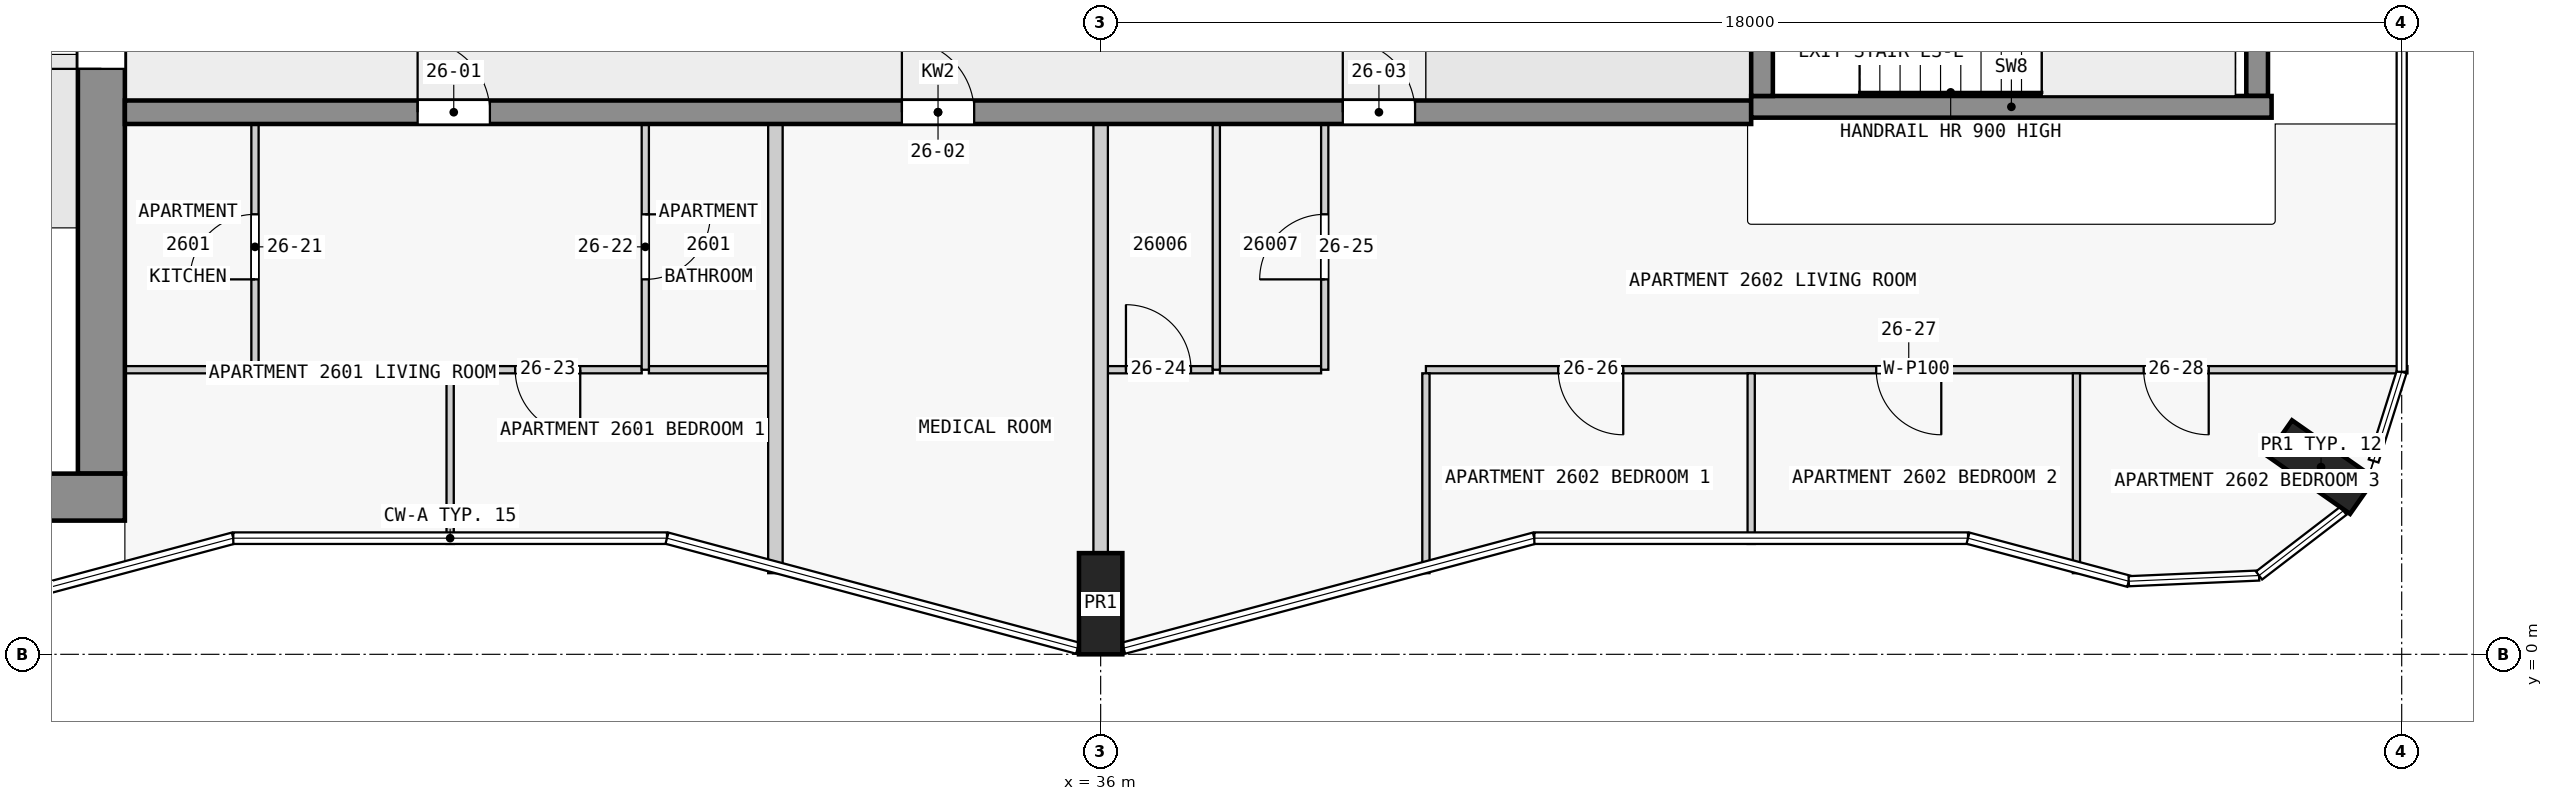
"""IFC4 building model, lengths in metres.
Left out: names, types, materials, properties, quantities, classifications, styles, units other than length and angle.
Written with IfcOpenShell. Run it as: python <this file> out.ifc"""

import sys

from ifc_helpers import new_model, si_unit, direction, frame, frame_2d, origin, origin_2d, place, context, subcontext, project, spatial, rectangle, extrude, element, fill, save


model = new_model("IFC4")
c1 = context("Model", 3, precision=1e-05, world=origin(), true_north=direction((0.0, 1.0)))
c2 = subcontext(c1, "Body", "Model", "MODEL_VIEW")
j1 = project(units=[si_unit("LENGTHUNIT", "METRE"), si_unit("PLANEANGLEUNIT", "RADIAN")], contexts=[c1])
p1 = place(None, origin())
s1 = spatial("IfcSite", under=j1, at=p1, CompositionType="ELEMENT")
p2 = place(p1, origin())
s2 = spatial("IfcBuilding", under=s1, at=p2, CompositionType="ELEMENT")
p3 = place(p2, frame((0.0, 0.0, 102.8)))
s3 = spatial("IfcBuildingStorey", under=s2, at=p3, CompositionType="ELEMENT", Elevation=102.8)
for number, where, z_axis, x_axis in (
    (1, (36.0, 0.7, 0.0), (0.0, 0.0, 1.0), (1.0, 0.0, 0.0)),
    (2, (52.884, 2.59, 0.0), (0.0, 0.0, 1.0), (0.574, 0.819, 0.0)),
):
    element("IfcColumn", number, at=place(p3, frame(where, z_axis=z_axis, x_axis=x_axis)), inside=s3, PredefinedType="COLUMN", context=c2, shape_type="SweptSolid", body=[
        extrude(rectangle(XDim=0.6, YDim=1.4, at=origin_2d()), origin(), (0.0, 0.0, 1.0), 3.5),
    ])
p4 = place(p3, frame((1.65, 2.175, 0.0), z_axis=(0.0, 0.0, 1.0), x_axis=(1.0, 0.0, 0.0)))
e3 = element("IfcWall", 3, at=p4, inside=s3, PredefinedType="SHEAR", context=c2, shape_type="SweptSolid", body=[
    extrude(rectangle(XDim=20.85, YDim=0.65, at=frame_2d((10.425, 0.0))), origin(), (0.0, 0.0, 1.0), 3.25),
])
p5 = place(p3, frame((22.175, 2.5, 0.0), z_axis=(0.0, 0.0, 1.0), x_axis=(0.0, 1.0, 0.0)))
e4 = element("IfcWall", 4, at=p5, inside=s3, PredefinedType="SHEAR", context=c2, shape_type="SweptSolid", body=[
    extrude(rectangle(XDim=14.85, YDim=0.65, at=frame_2d((7.425, 0.0))), origin(), (0.0, 0.0, 1.0), 3.25),
])
p6 = place(p5, frame((5.6, 0.0, 0.0)))
e5 = element("IfcOpeningElement", 5, at=p6, cuts=e4, PredefinedType="OPENING", context=c2, shape_type="SweptSolid", body=[
    extrude(rectangle(XDim=1.8, YDim=2.1, at=frame_2d((0.9, 1.05))), frame((0.0, 0.335, 0.0), z_axis=(0.0, -1.0, 0.0), x_axis=(1.0, 0.0, 0.0)), (0.0, 0.0, 1.0), 0.67),
])
p7 = place(p3, frame((45.15, 7.725, 0.0), z_axis=(0.0, 0.0, 1.0), x_axis=(0.0, 1.0, 0.0)))
e6 = element("IfcWall", 6, at=p7, inside=s3, PredefinedType="SHEAR", context=c2, shape_type="SweptSolid", body=[
    extrude(rectangle(XDim=2.55, YDim=0.3, at=frame_2d((1.275, 0.0))), origin(), (0.0, 0.0, 1.0), 3.5),
])
p8 = place(p7, frame((0.725, 0.0, 0.0)))
e7 = element("IfcOpeningElement", 7, at=p8, cuts=e6, PredefinedType="OPENING", context=c2, shape_type="SweptSolid", body=[
    extrude(rectangle(XDim=1.1, YDim=2.1, at=frame_2d((0.55, 1.05))), frame((0.0, 0.16, 0.0), z_axis=(0.0, -1.0, 0.0), x_axis=(1.0, 0.0, 0.0)), (0.0, 0.0, 1.0), 0.32),
])
p9 = place(p3, frame((52.0, 7.725, 0.0), z_axis=(0.0, 0.0, 1.0), x_axis=(0.0, 1.0, 0.0)))
e8 = element("IfcWall", 8, at=p9, inside=s3, PredefinedType="SHEAR", context=c2, shape_type="SweptSolid", body=[
    extrude(rectangle(XDim=2.55, YDim=0.3, at=frame_2d((1.275, 0.0))), origin(), (0.0, 0.0, 1.0), 3.5),
])
p10 = place(p3, frame((45.0, 7.575, 0.0), z_axis=(0.0, 0.0, 1.0), x_axis=(1.0, 0.0, 0.0)))
e9 = element("IfcWall", 9, at=p10, inside=s3, PredefinedType="SHEAR", context=c2, shape_type="SweptSolid", body=[
    extrude(rectangle(XDim=7.2, YDim=0.3, at=frame_2d((3.6, 0.0))), origin(), (0.0, 0.0, 1.0), 3.5),
])
p11 = place(p3, frame((22.5, 7.5, 0.0), z_axis=(0.0, 0.0, 1.0), x_axis=(1.0, 0.0, 0.0)))
e10 = element("IfcWall", 10, at=p11, inside=s3, PredefinedType="SHEAR", context=c2, shape_type="SweptSolid", body=[
    extrude(rectangle(XDim=22.5, YDim=0.325, at=frame_2d((11.25, 0.0))), origin(), (0.0, 0.0, 1.0), 3.25),
])
p12 = place(p11, frame((4.05, 0.0, 0.0)))
e11 = element("IfcOpeningElement", 11, at=p12, cuts=e10, PredefinedType="OPENING", context=c2, shape_type="SweptSolid", body=[
    extrude(rectangle(XDim=1.0, YDim=2.1, at=frame_2d((0.5, 1.05))), frame((0.0, 0.172, 0.0), z_axis=(0.0, -1.0, 0.0), x_axis=(1.0, 0.0, 0.0)), (0.0, 0.0, 1.0), 0.345),
])
p13 = place(p11, frame((10.75, 0.0, 0.0)))
e12 = element("IfcOpeningElement", 12, at=p13, cuts=e10, PredefinedType="OPENING", context=c2, shape_type="SweptSolid", body=[
    extrude(rectangle(XDim=1.0, YDim=2.1, at=frame_2d((0.5, 1.05))), frame((0.0, 0.172, 0.0), z_axis=(0.0, -1.0, 0.0), x_axis=(1.0, 0.0, 0.0)), (0.0, 0.0, 1.0), 0.345),
])
p14 = place(p11, frame((16.85, 0.0, 0.0)))
e13 = element("IfcOpeningElement", 13, at=p14, cuts=e10, PredefinedType="OPENING", context=c2, shape_type="SweptSolid", body=[
    extrude(rectangle(XDim=1.0, YDim=2.1, at=frame_2d((0.5, 1.05))), frame((0.0, 0.172, 0.0), z_axis=(0.0, -1.0, 0.0), x_axis=(1.0, 0.0, 0.0)), (0.0, 0.0, 1.0), 0.345),
])
p15 = place(p3, frame((29.65, 3.938, 0.0), z_axis=(0.0, 0.0, 1.0), x_axis=(-1.0, 0.0, 0.0)))
e14 = element("IfcWall", 14, at=p15, inside=s3, PredefinedType="PARTITIONING", context=c2, shape_type="SweptSolid", body=[
    extrude(rectangle(XDim=2.65, YDim=0.1, at=frame_2d((1.325, 0.0))), origin(), (0.0, 0.0, 1.0), 3.25),
])
p16 = place(p15, frame((0.85, 0.0, 0.0)))
e15 = element("IfcOpeningElement", 15, at=p16, cuts=e14, PredefinedType="OPENING", context=c2, shape_type="SweptSolid", body=[
    extrude(rectangle(XDim=0.9, YDim=2.1, at=frame_2d((0.45, 1.05))), frame((0.0, 0.06, 0.0), z_axis=(0.0, -1.0, 0.0), x_axis=(1.0, 0.0, 0.0)), (0.0, 0.0, 1.0), 0.12),
])
p17 = place(p3, frame((54.08, 3.938, 0.0), z_axis=(0.0, 0.0, 1.0), x_axis=(-1.0, 0.0, 0.0)))
e16 = element("IfcWall", 16, at=p17, inside=s3, PredefinedType="PARTITIONING", context=c2, shape_type="SweptSolid", body=[
    extrude(rectangle(XDim=13.58, YDim=0.1, at=frame_2d((6.79, 0.0))), origin(), (0.0, 0.0, 1.0), 3.25),
])
p18 = place(p17, frame((10.85, 0.0, 0.0)))
e17 = element("IfcOpeningElement", 17, at=p18, cuts=e16, PredefinedType="OPENING", context=c2, shape_type="SweptSolid", body=[
    extrude(rectangle(XDim=0.9, YDim=2.1, at=frame_2d((0.45, 1.05))), frame((0.0, 0.06, 0.0), z_axis=(0.0, -1.0, 0.0), x_axis=(1.0, 0.0, 0.0)), (0.0, 0.0, 1.0), 0.12),
])
p19 = place(p17, frame((6.45, 0.0, 0.0)))
e18 = element("IfcOpeningElement", 18, at=p19, cuts=e16, PredefinedType="OPENING", context=c2, shape_type="SweptSolid", body=[
    extrude(rectangle(XDim=0.9, YDim=2.1, at=frame_2d((0.45, 1.05))), frame((0.0, 0.06, 0.0), z_axis=(0.0, -1.0, 0.0), x_axis=(1.0, 0.0, 0.0)), (0.0, 0.0, 1.0), 0.12),
])
p20 = place(p17, frame((2.75, 0.0, 0.0)))
e19 = element("IfcOpeningElement", 19, at=p20, cuts=e16, PredefinedType="OPENING", context=c2, shape_type="SweptSolid", body=[
    extrude(rectangle(XDim=0.9, YDim=2.1, at=frame_2d((0.45, 1.05))), frame((0.0, 0.06, 0.0), z_axis=(0.0, -1.0, 0.0), x_axis=(1.0, 0.0, 0.0)), (0.0, 0.0, 1.0), 0.12),
])
p21 = place(p3, frame((22.5, 3.938, 0.0), z_axis=(0.0, 0.0, 1.0), x_axis=(1.0, 0.0, 0.0)))
e20 = element("IfcWall", 20, at=p21, inside=s3, PredefinedType="PARTITIONING", context=c2, shape_type="SweptSolid", body=[
    extrude(rectangle(XDim=1.75, YDim=0.1, at=frame_2d((0.875, 0.0))), origin(), (0.0, 0.0, 1.0), 3.25),
])
p22 = place(p3, frame((29.75, 3.938, 0.0), z_axis=(0.0, 0.0, 1.0), x_axis=(1.0, 0.0, 0.0)))
e21 = element("IfcWall", 21, at=p22, inside=s3, PredefinedType="PARTITIONING", context=c2, shape_type="SweptSolid", body=[
    extrude(rectangle(XDim=1.65, YDim=0.1, at=frame_2d((0.825, 0.0))), origin(), (0.0, 0.0, 1.0), 3.25),
])
p23 = place(p3, frame((36.1, 3.938, 0.0), z_axis=(0.0, 0.0, 1.0), x_axis=(1.0, 0.0, 0.0)))
e22 = element("IfcWall", 22, at=p23, inside=s3, PredefinedType="PARTITIONING", context=c2, shape_type="SweptSolid", body=[
    extrude(rectangle(XDim=1.45, YDim=0.1, at=frame_2d((0.725, 0.0))), origin(), (0.0, 0.0, 1.0), 3.25),
])
p24 = place(p23, frame((0.25, 0.0, 0.0)))
e23 = element("IfcOpeningElement", 23, at=p24, cuts=e22, PredefinedType="OPENING", context=c2, shape_type="SweptSolid", body=[
    extrude(rectangle(XDim=0.9, YDim=2.1, at=frame_2d((0.45, 1.05))), frame((0.0, 0.06, 0.0), z_axis=(0.0, -1.0, 0.0), x_axis=(1.0, 0.0, 0.0)), (0.0, 0.0, 1.0), 0.12),
])
p25 = place(p3, frame((37.65, 3.938, 0.0), z_axis=(0.0, 0.0, 1.0), x_axis=(1.0, 0.0, 0.0)))
e24 = element("IfcWall", 24, at=p25, inside=s3, PredefinedType="PARTITIONING", context=c2, shape_type="SweptSolid", body=[
    extrude(rectangle(XDim=1.4, YDim=0.1, at=frame_2d((0.7, 0.0))), origin(), (0.0, 0.0, 1.0), 3.25),
])
p26 = place(p3, frame((24.3, 3.938, 0.0), z_axis=(0.0, 0.0, 1.0), x_axis=(0.0, 1.0, 0.0)))
e25 = element("IfcWall", 25, at=p26, inside=s3, PredefinedType="PARTITIONING", context=c2, shape_type="SweptSolid", body=[
    extrude(rectangle(XDim=3.4, YDim=0.1, at=frame_2d((1.7, 0.0))), origin(), (0.0, 0.0, 1.0), 3.25),
])
p27 = place(p26, frame((1.25, 0.0, 0.0)))
e26 = element("IfcOpeningElement", 26, at=p27, cuts=e25, PredefinedType="OPENING", context=c2, shape_type="SweptSolid", body=[
    extrude(rectangle(XDim=0.9, YDim=2.1, at=frame_2d((0.45, 1.05))), frame((0.0, 0.06, 0.0), z_axis=(0.0, -1.0, 0.0), x_axis=(1.0, 0.0, 0.0)), (0.0, 0.0, 1.0), 0.12),
])
p28 = place(p3, frame((27.0, 3.887, 0.0), z_axis=(0.0, 0.0, 1.0), x_axis=(0.0, -1.0, 0.0)))
e27 = element("IfcWall", 27, at=p28, inside=s3, PredefinedType="PARTITIONING", context=c2, shape_type="SweptSolid", body=[
    extrude(rectangle(XDim=2.361, YDim=0.1, at=frame_2d((1.18, 0.0))), origin(), (0.0, 0.0, 1.0), 3.25),
])
p29 = place(p3, frame((29.7, 7.337, 0.0), z_axis=(0.0, 0.0, 1.0), x_axis=(0.0, -1.0, 0.0)))
e28 = element("IfcWall", 28, at=p29, inside=s3, PredefinedType="PARTITIONING", context=c2, shape_type="SweptSolid", body=[
    extrude(rectangle(XDim=3.4, YDim=0.1, at=frame_2d((1.7, 0.0))), origin(), (0.0, 0.0, 1.0), 3.25),
])
p30 = place(p29, frame((1.25, 0.0, 0.0)))
e29 = element("IfcOpeningElement", 29, at=p30, cuts=e28, PredefinedType="OPENING", context=c2, shape_type="SweptSolid", body=[
    extrude(rectangle(XDim=0.9, YDim=2.1, at=frame_2d((0.45, 1.05))), frame((0.0, 0.06, 0.0), z_axis=(0.0, -1.0, 0.0), x_axis=(1.0, 0.0, 0.0)), (0.0, 0.0, 1.0), 0.12),
])
p31 = place(p3, frame((31.5, 1.122, 0.0), z_axis=(0.0, 0.0, 1.0), x_axis=(0.0, 1.0, 0.0)))
e30 = element("IfcWall", 30, at=p31, inside=s3, PredefinedType="PARTITIONING", context=c2, shape_type="SweptSolid", body=[
    extrude(rectangle(XDim=6.215, YDim=0.2, at=frame_2d((3.107, 0.0))), origin(), (0.0, 0.0, 1.0), 3.25),
])
p32 = place(p3, frame((36.0, 1.4, 0.0), z_axis=(0.0, 0.0, 1.0), x_axis=(0.0, 1.0, 0.0)))
e31 = element("IfcWall", 31, at=p32, inside=s3, PredefinedType="PARTITIONING", context=c2, shape_type="SweptSolid", body=[
    extrude(rectangle(XDim=5.938, YDim=0.2, at=frame_2d((2.969, 0.0))), origin(), (0.0, 0.0, 1.0), 3.25),
])
p33 = place(p3, frame((37.6, 3.938, 0.0), z_axis=(0.0, 0.0, 1.0), x_axis=(0.0, 1.0, 0.0)))
e32 = element("IfcWall", 32, at=p33, inside=s3, PredefinedType="PARTITIONING", context=c2, shape_type="SweptSolid", body=[
    extrude(rectangle(XDim=3.4, YDim=0.1, at=frame_2d((1.7, 0.0))), origin(), (0.0, 0.0, 1.0), 3.25),
])
p34 = place(p3, frame((39.1, 3.938, 0.0), z_axis=(0.0, 0.0, 1.0), x_axis=(0.0, 1.0, 0.0)))
e33 = element("IfcWall", 33, at=p34, inside=s3, PredefinedType="PARTITIONING", context=c2, shape_type="SweptSolid", body=[
    extrude(rectangle(XDim=3.4, YDim=0.1, at=frame_2d((1.7, 0.0))), origin(), (0.0, 0.0, 1.0), 3.25),
])
p35 = place(p34, frame((1.25, 0.0, 0.0)))
e34 = element("IfcOpeningElement", 34, at=p35, cuts=e33, PredefinedType="OPENING", context=c2, shape_type="SweptSolid", body=[
    extrude(rectangle(XDim=0.9, YDim=2.1, at=frame_2d((0.45, 1.05))), frame((0.0, 0.06, 0.0), z_axis=(0.0, -1.0, 0.0), x_axis=(1.0, 0.0, 0.0)), (0.0, 0.0, 1.0), 0.12),
])
p36 = place(p3, frame((40.5, 3.887, 0.0), z_axis=(0.0, 0.0, 1.0), x_axis=(0.0, -1.0, 0.0)))
e35 = element("IfcWall", 35, at=p36, inside=s3, PredefinedType="PARTITIONING", context=c2, shape_type="SweptSolid", body=[
    extrude(rectangle(XDim=2.765, YDim=0.1, at=frame_2d((1.383, 0.0))), origin(), (0.0, 0.0, 1.0), 3.25),
])
p37 = place(p3, frame((45.0, 1.527, 0.0), z_axis=(0.0, 0.0, 1.0), x_axis=(0.0, 1.0, 0.0)))
e36 = element("IfcWall", 36, at=p37, inside=s3, PredefinedType="PARTITIONING", context=c2, shape_type="SweptSolid", body=[
    extrude(rectangle(XDim=2.361, YDim=0.1, at=frame_2d((1.18, 0.0))), origin(), (0.0, 0.0, 1.0), 3.25),
])
p38 = place(p3, frame((49.5, 1.122, 0.0), z_axis=(0.0, 0.0, 1.0), x_axis=(0.0, 1.0, 0.0)))
e37 = element("IfcWall", 37, at=p38, inside=s3, PredefinedType="PARTITIONING", context=c2, shape_type="SweptSolid", body=[
    extrude(rectangle(XDim=2.765, YDim=0.1, at=frame_2d((1.383, 0.0))), origin(), (0.0, 0.0, 1.0), 3.25),
])
p39 = place(p6, origin())
e38 = element("IfcDoor", 38, at=p39, inside=s3, OperationType="DOUBLE_DOOR_SINGLE_SWING", PredefinedType="DOOR", context=c2, shape_type="SweptSolid", body=[
    extrude(rectangle(XDim=1.8, YDim=2.1, at=frame_2d((0.9, 1.05))), frame((0.0, 0.025, 0.0), z_axis=(0.0, -1.0, 0.0), x_axis=(1.0, 0.0, 0.0)), (0.0, 0.0, 1.0), 0.05),
])
fill(e5, e38)
p40 = place(p12, origin())
e39 = element("IfcDoor", 39, at=p40, inside=s3, OperationType="SINGLE_SWING_LEFT", PredefinedType="DOOR", context=c2, shape_type="SweptSolid", body=[
    extrude(rectangle(XDim=1.0, YDim=2.1, at=frame_2d((0.5, 1.05))), frame((0.0, 0.025, 0.0), z_axis=(0.0, -1.0, 0.0), x_axis=(1.0, 0.0, 0.0)), (0.0, 0.0, 1.0), 0.05),
])
fill(e11, e39)
p41 = place(p13, origin())
e40 = element("IfcDoor", 40, at=p41, inside=s3, OperationType="SINGLE_SWING_LEFT", PredefinedType="DOOR", context=c2, shape_type="SweptSolid", body=[
    extrude(rectangle(XDim=1.0, YDim=2.1, at=frame_2d((0.5, 1.05))), frame((0.0, 0.025, 0.0), z_axis=(0.0, -1.0, 0.0), x_axis=(1.0, 0.0, 0.0)), (0.0, 0.0, 1.0), 0.05),
])
fill(e12, e40)
p42 = place(p14, origin())
e41 = element("IfcDoor", 41, at=p42, inside=s3, OperationType="SINGLE_SWING_RIGHT", PredefinedType="DOOR", context=c2, shape_type="SweptSolid", body=[
    extrude(rectangle(XDim=1.0, YDim=2.1, at=frame_2d((0.5, 1.05))), frame((0.0, 0.025, 0.0), z_axis=(0.0, -1.0, 0.0), x_axis=(1.0, 0.0, 0.0)), (0.0, 0.0, 1.0), 0.05),
])
fill(e13, e41)
p43 = place(p27, origin())
e42 = element("IfcDoor", 42, at=p43, inside=s3, OperationType="SINGLE_SWING_LEFT", PredefinedType="DOOR", context=c2, shape_type="SweptSolid", body=[
    extrude(rectangle(XDim=0.9, YDim=2.1, at=frame_2d((0.45, 1.05))), frame((0.0, 0.025, 0.0), z_axis=(0.0, -1.0, 0.0), x_axis=(1.0, 0.0, 0.0)), (0.0, 0.0, 1.0), 0.05),
])
fill(e26, e42)
p44 = place(p30, origin())
e43 = element("IfcDoor", 43, at=p44, inside=s3, OperationType="SINGLE_SWING_LEFT", PredefinedType="DOOR", context=c2, shape_type="SweptSolid", body=[
    extrude(rectangle(XDim=0.9, YDim=2.1, at=frame_2d((0.45, 1.05))), frame((0.0, 0.025, 0.0), z_axis=(0.0, -1.0, 0.0), x_axis=(1.0, 0.0, 0.0)), (0.0, 0.0, 1.0), 0.05),
])
fill(e29, e43)
p45 = place(p16, origin())
e44 = element("IfcDoor", 44, at=p45, inside=s3, OperationType="SINGLE_SWING_LEFT", PredefinedType="DOOR", context=c2, shape_type="SweptSolid", body=[
    extrude(rectangle(XDim=0.9, YDim=2.1, at=frame_2d((0.45, 1.05))), frame((0.0, 0.025, 0.0), z_axis=(0.0, -1.0, 0.0), x_axis=(1.0, 0.0, 0.0)), (0.0, 0.0, 1.0), 0.05),
])
fill(e15, e44)
p46 = place(p24, origin())
e45 = element("IfcDoor", 45, at=p46, inside=s3, OperationType="SINGLE_SWING_LEFT", PredefinedType="DOOR", context=c2, shape_type="SweptSolid", body=[
    extrude(rectangle(XDim=0.9, YDim=2.1, at=frame_2d((0.45, 1.05))), frame((0.0, 0.025, 0.0), z_axis=(0.0, -1.0, 0.0), x_axis=(1.0, 0.0, 0.0)), (0.0, 0.0, 1.0), 0.05),
])
fill(e23, e45)
p47 = place(p35, origin())
e46 = element("IfcDoor", 46, at=p47, inside=s3, OperationType="SINGLE_SWING_LEFT", PredefinedType="DOOR", context=c2, shape_type="SweptSolid", body=[
    extrude(rectangle(XDim=0.9, YDim=2.1, at=frame_2d((0.45, 1.05))), frame((0.0, 0.025, 0.0), z_axis=(0.0, -1.0, 0.0), x_axis=(1.0, 0.0, 0.0)), (0.0, 0.0, 1.0), 0.05),
])
fill(e34, e46)
p48 = place(p18, origin())
e47 = element("IfcDoor", 47, at=p48, inside=s3, OperationType="SINGLE_SWING_RIGHT", PredefinedType="DOOR", context=c2, shape_type="SweptSolid", body=[
    extrude(rectangle(XDim=0.9, YDim=2.1, at=frame_2d((0.45, 1.05))), frame((0.0, 0.025, 0.0), z_axis=(0.0, -1.0, 0.0), x_axis=(1.0, 0.0, 0.0)), (0.0, 0.0, 1.0), 0.05),
])
fill(e17, e47)
p49 = place(p19, origin())
e48 = element("IfcDoor", 48, at=p49, inside=s3, OperationType="SINGLE_SWING_RIGHT", PredefinedType="DOOR", context=c2, shape_type="SweptSolid", body=[
    extrude(rectangle(XDim=0.9, YDim=2.1, at=frame_2d((0.45, 1.05))), frame((0.0, 0.025, 0.0), z_axis=(0.0, -1.0, 0.0), x_axis=(1.0, 0.0, 0.0)), (0.0, 0.0, 1.0), 0.05),
])
fill(e18, e48)
p50 = place(p20, origin())
e49 = element("IfcDoor", 49, at=p50, inside=s3, OperationType="SINGLE_SWING_LEFT", PredefinedType="DOOR", context=c2, shape_type="SweptSolid", body=[
    extrude(rectangle(XDim=0.9, YDim=2.1, at=frame_2d((0.45, 1.05))), frame((0.0, 0.025, 0.0), z_axis=(0.0, -1.0, 0.0), x_axis=(1.0, 0.0, 0.0)), (0.0, 0.0, 1.0), 0.05),
])
fill(e19, e49)
save(model, sys.argv[1])
